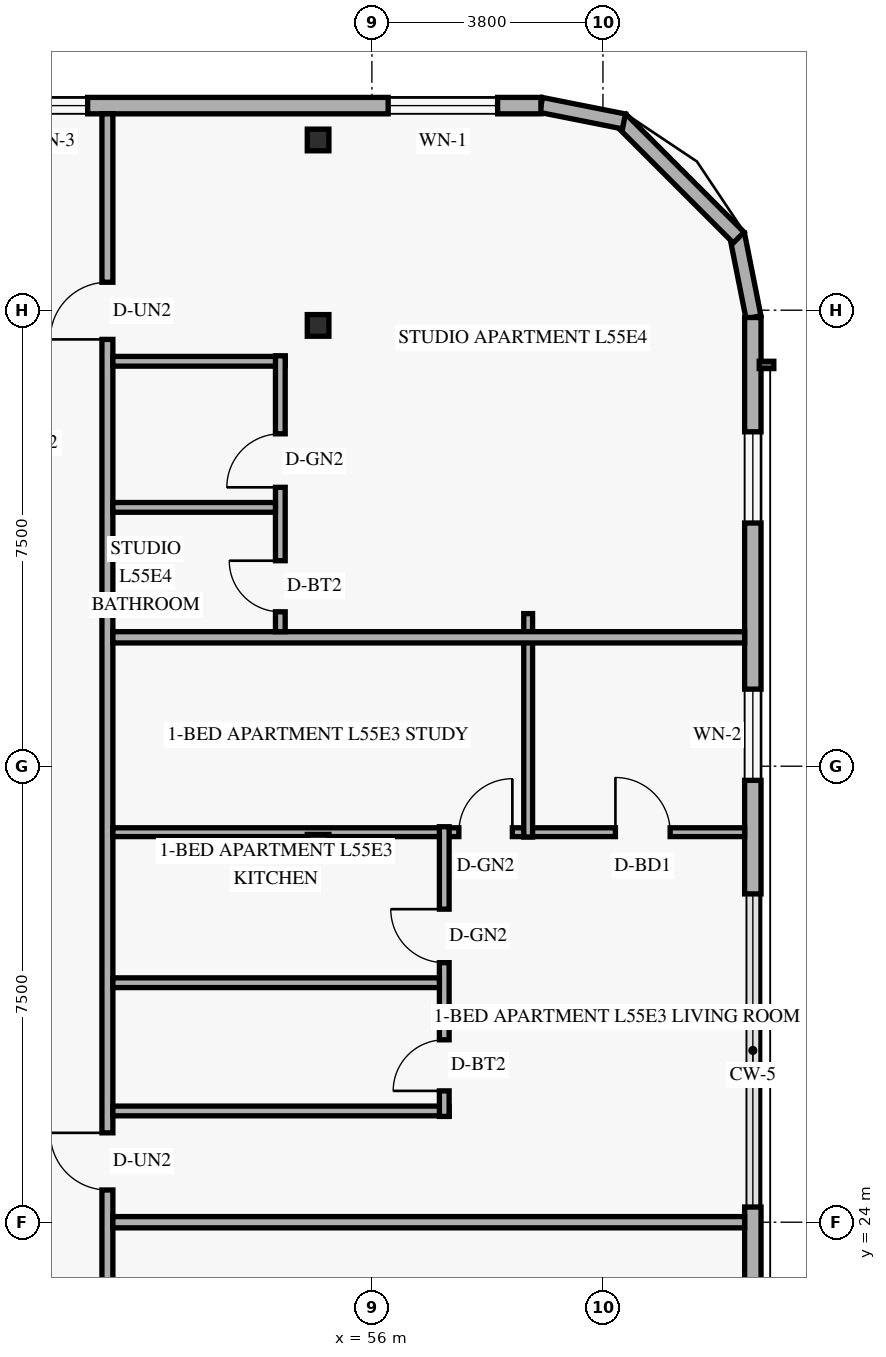
"""IFC4 building model, lengths in metres.
Left out: names, types, materials, properties, quantities, classifications, styles, units other than length and angle.
Written with IfcOpenShell. Run it as: python <this file> out.ifc"""

import sys

from ifc_helpers import new_model, si_unit, direction, frame, frame_2d, origin, origin_2d, place, context, subcontext, project, spatial, rectangle, hollow_rectangle, extrude, element, fill, save


model = new_model("IFC4")
c1 = context("Model", 3, precision=1e-05, world=origin(), true_north=direction((0.0, 1.0)))
c2 = subcontext(c1, "Body", "Model", "MODEL_VIEW")
j1 = project(units=[si_unit("LENGTHUNIT", "METRE"), si_unit("PLANEANGLEUNIT", "RADIAN")], contexts=[c1])
p1 = place(None, origin())
s1 = spatial("IfcSite", under=j1, at=p1, CompositionType="ELEMENT")
p2 = place(p1, origin())
s2 = spatial("IfcBuilding", under=s1, at=p2, CompositionType="ELEMENT")
p3 = place(p2, frame((0.0, 0.0, 213.0)))
s3 = spatial("IfcBuildingStorey", under=s2, at=p3, CompositionType="ELEMENT", Elevation=213.0)
for number, where, z_axis, x_axis in (
    (1, (55.011, 30.2, 0.0), (0.058, 0.0, 0.998), (0.0, 1.0, 0.0)),
    (2, (55.011, 38.75, 0.0), (0.058, 0.0, 0.998), (0.0, 1.0, 0.0)),
    (3, (55.011, 41.8, 0.0), (0.058, 0.0, 0.998), (0.0, 1.0, 0.0)),
):
    element("IfcColumn", number, at=place(p3, frame(where, z_axis=z_axis, x_axis=x_axis)), inside=s3, PredefinedType="COLUMN", context=c2, shape_type="SweptSolid", body=[
        extrude(hollow_rectangle(XDim=0.356, YDim=0.356, WallThickness=0.016, at=origin_2d()), origin(), (0.0, 0.0, 1.0), 3.606),
    ])
p4 = place(p3, frame((62.276, 38.884, 0.0), z_axis=(0.0, 0.0, 1.0), x_axis=(-0.195135625965, 0.9807762678, 0.0)))
e4 = element("IfcWall", 4, at=p4, inside=s3, PredefinedType="SOLIDWALL", context=c2, shape_type="SweptSolid", body=[
    extrude(rectangle(XDim=1.389, YDim=0.25, at=frame_2d((0.694, 0.0))), origin(), (0.0, 0.0, 1.0), 3.36),
])
p5 = place(p3, frame((62.032, 40.195, 0.0), z_axis=(0.0, 0.0, 1.0), x_axis=(-0.707106781187, 0.707106781187, 0.0)))
e5 = element("IfcWall", 5, at=p5, inside=s3, PredefinedType="SOLIDWALL", context=c2, shape_type="SweptSolid", body=[
    extrude(rectangle(XDim=2.739, YDim=0.25, at=frame_2d((1.37, 0.0))), origin(), (0.0, 0.0, 1.0), 3.36),
])
p6 = place(p3, frame((60.146, 42.105, 0.0), z_axis=(0.0, 0.0, 1.0), x_axis=(-0.980809899341, 0.19496651342, 0.0)))
e6 = element("IfcWall", 6, at=p6, inside=s3, PredefinedType="SOLIDWALL", context=c2, shape_type="SweptSolid", body=[
    extrude(rectangle(XDim=1.389, YDim=0.25, at=frame_2d((0.694, 0.0))), origin(), (0.0, 0.0, 1.0), 3.36),
])
p7 = place(p3, frame((62.265, 9.12, 0.0), z_axis=(0.0, 0.0, 1.0), x_axis=(0.0, 1.0, 0.0)))
e7 = element("IfcWall", 7, at=p7, inside=s3, PredefinedType="SOLIDWALL", context=c2, shape_type="SweptSolid", body=[
    extrude(rectangle(XDim=15.13, YDim=0.27, at=frame_2d((7.565, 0.0))), origin(), (0.0, 0.0, 1.0), 3.36),
])
p8 = place(p7, frame((1.88, 0.0, 0.85)))
e8 = element("IfcOpeningElement", 8, at=p8, cuts=e7, PredefinedType="OPENING", context=c2, shape_type="SweptSolid", body=[
    extrude(rectangle(XDim=1.5, YDim=1.55, at=frame_2d((0.75, 0.775))), frame((0.0, 0.145, 0.0), z_axis=(0.0, -1.0, 0.0), x_axis=(1.0, 0.0, 0.0)), (0.0, 0.0, 1.0), 0.29),
])
p9 = place(p7, frame((7.455, 0.0, 0.85)))
e9 = element("IfcOpeningElement", 9, at=p9, cuts=e7, PredefinedType="OPENING", context=c2, shape_type="SweptSolid", body=[
    extrude(rectangle(XDim=1.5, YDim=1.55, at=frame_2d((0.75, 0.775))), frame((0.0, 0.145, 0.0), z_axis=(0.0, -1.0, 0.0), x_axis=(1.0, 0.0, 0.0)), (0.0, 0.0, 1.0), 0.29),
])
p10 = place(p7, frame((12.39, 0.0, 0.85)))
e10 = element("IfcOpeningElement", 10, at=p10, cuts=e7, PredefinedType="OPENING", context=c2, shape_type="SweptSolid", body=[
    extrude(rectangle(XDim=1.5, YDim=1.55, at=frame_2d((0.75, 0.775))), frame((0.0, 0.145, 0.0), z_axis=(0.0, -1.0, 0.0), x_axis=(1.0, 0.0, 0.0)), (0.0, 0.0, 1.0), 0.29),
])
p11 = place(p3, frame((62.265, 29.4, 0.0), z_axis=(0.0, 0.0, 1.0), x_axis=(0.0, 1.0, 0.0)))
e11 = element("IfcWall", 11, at=p11, inside=s3, PredefinedType="SOLIDWALL", context=c2, shape_type="SweptSolid", body=[
    extrude(rectangle(XDim=9.48, YDim=0.27, at=frame_2d((4.74, 0.0))), origin(), (0.0, 0.0, 1.0), 3.36),
])
p12 = place(p11, frame((1.867, 0.0, 0.85)))
e12 = element("IfcOpeningElement", 12, at=p12, cuts=e11, PredefinedType="OPENING", context=c2, shape_type="SweptSolid", body=[
    extrude(rectangle(XDim=1.5, YDim=1.55, at=frame_2d((0.75, 0.775))), frame((0.0, 0.145, 0.0), z_axis=(0.0, -1.0, 0.0), x_axis=(1.0, 0.0, 0.0)), (0.0, 0.0, 1.0), 0.29),
])
p13 = place(p11, frame((6.1, 0.0, 0.85)))
e13 = element("IfcOpeningElement", 13, at=p13, cuts=e11, PredefinedType="OPENING", context=c2, shape_type="SweptSolid", body=[
    extrude(rectangle(XDim=1.5, YDim=1.55, at=frame_2d((0.75, 0.775))), frame((0.0, 0.145, 0.0), z_axis=(0.0, -1.0, 0.0), x_axis=(1.0, 0.0, 0.0)), (0.0, 0.0, 1.0), 0.29),
])
p14 = place(p3, frame((58.78, 42.365, 0.0), z_axis=(0.0, 0.0, 1.0), x_axis=(-1.0, 0.0, 0.0)))
e14 = element("IfcWall", 14, at=p14, inside=s3, PredefinedType="SOLIDWALL", context=c2, shape_type="SweptSolid", body=[
    extrude(rectangle(XDim=32.96, YDim=0.27, at=frame_2d((16.48, 0.0))), origin(), (0.0, 0.0, 1.0), 3.36),
])
p15 = place(p14, frame((27.59, 0.0, 0.85)))
e15 = element("IfcOpeningElement", 15, at=p15, cuts=e14, PredefinedType="OPENING", context=c2, shape_type="SweptSolid", body=[
    extrude(rectangle(XDim=1.8, YDim=1.6, at=frame_2d((0.9, 0.8))), frame((0.0, 0.145, 0.0), z_axis=(0.0, -1.0, 0.0), x_axis=(1.0, 0.0, 0.0)), (0.0, 0.0, 1.0), 0.29),
])
p16 = place(p14, frame((15.123, 0.0, 0.85)))
e16 = element("IfcOpeningElement", 16, at=p16, cuts=e14, PredefinedType="OPENING", context=c2, shape_type="SweptSolid", body=[
    extrude(rectangle(XDim=1.8, YDim=1.6, at=frame_2d((0.9, 0.8))), frame((0.0, 0.145, 0.0), z_axis=(0.0, -1.0, 0.0), x_axis=(1.0, 0.0, 0.0)), (0.0, 0.0, 1.0), 0.29),
])
p17 = place(p14, frame((7.455, 0.0, 0.85)))
e17 = element("IfcOpeningElement", 17, at=p17, cuts=e14, PredefinedType="OPENING", context=c2, shape_type="SweptSolid", body=[
    extrude(rectangle(XDim=1.2, YDim=1.5, at=frame_2d((0.6, 0.75))), frame((0.0, 0.145, 0.0), z_axis=(0.0, -1.0, 0.0), x_axis=(1.0, 0.0, 0.0)), (0.0, 0.0, 1.0), 0.29),
])
p18 = place(p14, frame((0.712, 0.0, 0.85)))
e18 = element("IfcOpeningElement", 18, at=p18, cuts=e14, PredefinedType="OPENING", context=c2, shape_type="SweptSolid", body=[
    extrude(rectangle(XDim=1.8, YDim=1.6, at=frame_2d((0.9, 0.8))), frame((0.0, 0.145, 0.0), z_axis=(0.0, -1.0, 0.0), x_axis=(1.0, 0.0, 0.0)), (0.0, 0.0, 1.0), 0.29),
])
p19 = place(p3, frame((51.65, 5.77, 0.0), z_axis=(0.0, 0.0, 1.0), x_axis=(0.0, 1.0, 0.0)))
e19 = element("IfcWall", 19, at=p19, inside=s3, PredefinedType="STANDARD", context=c2, shape_type="SweptSolid", body=[
    extrude(rectangle(XDim=36.46, YDim=0.18, at=frame_2d((18.23, 0.0))), origin(), (0.0, 0.0, 1.0), 2.803),
])
p20 = place(p19, frame((2.67, 0.0, 0.0)))
e20 = element("IfcOpeningElement", 20, at=p20, cuts=e19, PredefinedType="OPENING", context=c2, shape_type="SweptSolid", body=[
    extrude(rectangle(XDim=0.94, YDim=2.15, at=frame_2d((0.47, 1.075))), frame((0.0, 0.1, 0.0), z_axis=(0.0, -1.0, 0.0), x_axis=(1.0, 0.0, 0.0)), (0.0, 0.0, 1.0), 0.2),
])
p21 = place(p19, frame((13.61, 0.0, 0.0)))
e21 = element("IfcOpeningElement", 21, at=p21, cuts=e19, PredefinedType="OPENING", context=c2, shape_type="SweptSolid", body=[
    extrude(rectangle(XDim=0.94, YDim=2.15, at=frame_2d((0.47, 1.075))), frame((0.0, 0.1, 0.0), z_axis=(0.0, -1.0, 0.0), x_axis=(1.0, 0.0, 0.0)), (0.0, 0.0, 1.0), 0.2),
])
p22 = place(p19, frame((18.76, 0.0, 0.0)))
e22 = element("IfcOpeningElement", 22, at=p22, cuts=e19, PredefinedType="OPENING", context=c2, shape_type="SweptSolid", body=[
    extrude(rectangle(XDim=0.94, YDim=2.15, at=frame_2d((0.47, 1.075))), frame((0.0, 0.1, 0.0), z_axis=(0.0, -1.0, 0.0), x_axis=(1.0, 0.0, 0.0)), (0.0, 0.0, 1.0), 0.2),
])
p23 = place(p19, frame((32.75, 0.0, 0.0)))
e23 = element("IfcOpeningElement", 23, at=p23, cuts=e19, PredefinedType="OPENING", context=c2, shape_type="SweptSolid", body=[
    extrude(rectangle(XDim=0.94, YDim=2.15, at=frame_2d((0.47, 1.075))), frame((0.0, 0.1, 0.0), z_axis=(0.0, -1.0, 0.0), x_axis=(1.0, 0.0, 0.0)), (0.0, 0.0, 1.0), 0.2),
])
p24 = place(p3, frame((51.74, 24.0, 0.0), z_axis=(0.0, 0.0, 1.0), x_axis=(1.0, 0.0, 0.0)))
e24 = element("IfcWall", 24, at=p24, inside=s3, PredefinedType="PARTITIONING", context=c2, shape_type="SweptSolid", body=[
    extrude(rectangle(XDim=10.39, YDim=0.185, at=frame_2d((5.195, 0.0))), origin(), (0.0, 0.0, 1.0), 2.879),
])
p25 = place(p3, frame((51.74, 30.415, 0.0), z_axis=(0.0, 0.0, 1.0), x_axis=(1.0, 0.0, 0.0)))
e25 = element("IfcWall", 25, at=p25, inside=s3, PredefinedType="PARTITIONING", context=c2, shape_type="SweptSolid", body=[
    extrude(rectangle(XDim=10.39, YDim=0.145, at=frame_2d((5.195, 0.0))), origin(), (0.0, 0.0, 1.0), 2.879),
])
p26 = place(p25, frame((5.69, 0.0, 0.0)))
e26 = element("IfcOpeningElement", 26, at=p26, cuts=e25, PredefinedType="OPENING", context=c2, shape_type="SweptSolid", body=[
    extrude(rectangle(XDim=0.88, YDim=2.12, at=frame_2d((0.44, 1.06))), frame((0.0, 0.083, 0.0), z_axis=(0.0, -1.0, 0.0), x_axis=(1.0, 0.0, 0.0)), (0.0, 0.0, 1.0), 0.165),
])
p27 = place(p25, frame((8.265, 0.0, 0.0)))
e27 = element("IfcOpeningElement", 27, at=p27, cuts=e25, PredefinedType="OPENING", context=c2, shape_type="SweptSolid", body=[
    extrude(rectangle(XDim=0.9, YDim=2.14, at=frame_2d((0.45, 1.07))), frame((0.0, 0.083, 0.0), z_axis=(0.0, -1.0, 0.0), x_axis=(1.0, 0.0, 0.0)), (0.0, 0.0, 1.0), 0.165),
])
p28 = place(p3, frame((51.74, 25.83, 0.0), z_axis=(0.0, 0.0, 1.0), x_axis=(1.0, 0.0, 0.0)))
e28 = element("IfcWall", 28, at=p28, inside=s3, PredefinedType="PLUMBINGWALL", context=c2, shape_type="SweptSolid", body=[
    extrude(rectangle(XDim=5.53, YDim=0.16, at=frame_2d((2.765, 0.0))), origin(), (0.0, 0.0, 1.0), 2.879),
])
p29 = place(p3, frame((57.19, 25.74, 0.0), z_axis=(0.0, 0.0, 1.0), x_axis=(0.0, 1.0, 0.0)))
e29 = element("IfcWall", 29, at=p29, inside=s3, PredefinedType="PLUMBINGWALL", context=c2, shape_type="SweptSolid", body=[
    extrude(rectangle(XDim=4.765, YDim=0.16, at=frame_2d((2.382, 0.0))), origin(), (0.0, 0.0, 1.0), 3.36),
])
p30 = place(p29, frame((0.42, 0.0, 0.0)))
e30 = element("IfcOpeningElement", 30, at=p30, cuts=e29, PredefinedType="OPENING", context=c2, shape_type="SweptSolid", body=[
    extrude(rectangle(XDim=0.84, YDim=2.12, at=frame_2d((0.42, 1.06))), frame((0.0, 0.09, 0.0), z_axis=(0.0, -1.0, 0.0), x_axis=(1.0, 0.0, 0.0)), (0.0, 0.0, 1.0), 0.18),
])
p31 = place(p29, frame((2.529, 0.0, 0.0)))
e31 = element("IfcOpeningElement", 31, at=p31, cuts=e29, PredefinedType="OPENING", context=c2, shape_type="SweptSolid", body=[
    extrude(rectangle(XDim=0.88, YDim=2.12, at=frame_2d((0.44, 1.06))), frame((0.0, 0.09, 0.0), z_axis=(0.0, -1.0, 0.0), x_axis=(1.0, 0.0, 0.0)), (0.0, 0.0, 1.0), 0.18),
])
p32 = place(p3, frame((51.74, 27.939, 0.0), z_axis=(0.0, 0.0, 1.0), x_axis=(1.0, 0.0, 0.0)))
e32 = element("IfcWall", 32, at=p32, inside=s3, PredefinedType="PLUMBINGWALL", context=c2, shape_type="SweptSolid", body=[
    extrude(rectangle(XDim=5.37, YDim=0.16, at=frame_2d((2.685, 0.0))), origin(), (0.0, 0.0, 1.0), 2.879),
])
p33 = place(p3, frame((58.57, 30.335, 0.0), z_axis=(0.0, 0.0, 1.0), x_axis=(0.0, 1.0, 0.0)))
e33 = element("IfcWall", 33, at=p33, inside=s3, PredefinedType="PARTITIONING", context=c2, shape_type="SweptSolid", body=[
    extrude(rectangle(XDim=3.675, YDim=0.145, at=frame_2d((1.838, 0.0))), origin(), (0.0, 0.0, 1.0), 3.36),
])
p34 = place(p3, frame((51.74, 33.62, 0.0), z_axis=(0.0, 0.0, 1.0), x_axis=(1.0, 0.0, 0.0)))
e34 = element("IfcWall", 34, at=p34, inside=s3, PredefinedType="PARTITIONING", context=c2, shape_type="SweptSolid", body=[
    extrude(rectangle(XDim=10.39, YDim=0.185, at=frame_2d((5.195, 0.0))), origin(), (0.0, 0.0, 1.0), 2.879),
])
p35 = place(p3, frame((51.74, 38.16, 0.0), z_axis=(0.0, 0.0, 1.0), x_axis=(1.0, 0.0, 0.0)))
e35 = element("IfcWall", 35, at=p35, inside=s3, PredefinedType="PLUMBINGWALL", context=c2, shape_type="SweptSolid", body=[
    extrude(rectangle(XDim=2.834, YDim=0.16, at=frame_2d((1.417, 0.0))), origin(), (0.0, 0.0, 1.0), 3.36),
])
p36 = place(p3, frame((54.494, 33.712, 0.0), z_axis=(0.0, 0.0, 1.0), x_axis=(0.0, 1.0, 0.0)))
e36 = element("IfcWall", 36, at=p36, inside=s3, PredefinedType="PLUMBINGWALL", context=c2, shape_type="SweptSolid", body=[
    extrude(rectangle(XDim=4.538, YDim=0.16, at=frame_2d((2.269, 0.0))), origin(), (0.0, 0.0, 1.0), 3.039),
])
p37 = place(p36, frame((0.327, 0.0, 0.0)))
e37 = element("IfcOpeningElement", 37, at=p37, cuts=e36, PredefinedType="OPENING", context=c2, shape_type="SweptSolid", body=[
    extrude(rectangle(XDim=0.84, YDim=2.12, at=frame_2d((0.42, 1.06))), frame((0.0, 0.09, 0.0), z_axis=(0.0, -1.0, 0.0), x_axis=(1.0, 0.0, 0.0)), (0.0, 0.0, 1.0), 0.18),
])
p38 = place(p36, frame((2.375, 0.0, 0.0)))
e38 = element("IfcOpeningElement", 38, at=p38, cuts=e36, PredefinedType="OPENING", context=c2, shape_type="SweptSolid", body=[
    extrude(rectangle(XDim=0.88, YDim=2.12, at=frame_2d((0.44, 1.06))), frame((0.0, 0.09, 0.0), z_axis=(0.0, -1.0, 0.0), x_axis=(1.0, 0.0, 0.0)), (0.0, 0.0, 1.0), 0.18),
])
p39 = place(p3, frame((51.74, 35.757, 0.0), z_axis=(0.0, 0.0, 1.0), x_axis=(1.0, 0.0, 0.0)))
e39 = element("IfcWall", 39, at=p39, inside=s3, PredefinedType="PLUMBINGWALL", context=c2, shape_type="SweptSolid", body=[
    extrude(rectangle(XDim=2.674, YDim=0.16, at=frame_2d((1.337, 0.0))), origin(), (0.0, 0.0, 1.0), 3.36),
])
p40 = place(p12, origin())
e40 = element("IfcWindow", 40, at=p40, inside=s3, PartitioningType="SINGLE_PANEL", PredefinedType="WINDOW", context=c2, shape_type="SweptSolid", body=[
    extrude(rectangle(XDim=1.5, YDim=1.55, at=frame_2d((0.75, 0.775))), frame((0.0, 0.03, 0.0), z_axis=(0.0, -1.0, 0.0), x_axis=(1.0, 0.0, 0.0)), (0.0, 0.0, 1.0), 0.06),
])
fill(e12, e40)
p41 = place(p13, origin())
e41 = element("IfcWindow", 41, at=p41, inside=s3, PartitioningType="SINGLE_PANEL", PredefinedType="WINDOW", context=c2, shape_type="SweptSolid", body=[
    extrude(rectangle(XDim=1.5, YDim=1.55, at=frame_2d((0.75, 0.775))), frame((0.0, 0.03, 0.0), z_axis=(0.0, -1.0, 0.0), x_axis=(1.0, 0.0, 0.0)), (0.0, 0.0, 1.0), 0.06),
])
fill(e13, e41)
p42 = place(p17, origin())
e42 = element("IfcWindow", 42, at=p42, inside=s3, PartitioningType="SINGLE_PANEL", PredefinedType="WINDOW", context=c2, shape_type="SweptSolid", body=[
    extrude(rectangle(XDim=1.2, YDim=1.5, at=frame_2d((0.6, 0.75))), frame((0.0, 0.03, 0.0), z_axis=(0.0, -1.0, 0.0), x_axis=(1.0, 0.0, 0.0)), (0.0, 0.0, 1.0), 0.06),
])
fill(e17, e42)
p43 = place(p18, origin())
e43 = element("IfcWindow", 43, at=p43, inside=s3, PartitioningType="SINGLE_PANEL", PredefinedType="WINDOW", context=c2, shape_type="SweptSolid", body=[
    extrude(rectangle(XDim=1.8, YDim=1.6, at=frame_2d((0.9, 0.8))), frame((0.0, 0.03, 0.0), z_axis=(0.0, -1.0, 0.0), x_axis=(1.0, 0.0, 0.0)), (0.0, 0.0, 1.0), 0.06),
])
fill(e18, e43)
p44 = place(p22, origin())
e44 = element("IfcDoor", 44, at=p44, inside=s3, OperationType="SINGLE_SWING_RIGHT", PredefinedType="DOOR", context=c2, shape_type="SweptSolid", body=[
    extrude(rectangle(XDim=0.94, YDim=2.15, at=frame_2d((0.47, 1.075))), frame((0.0, 0.025, 0.0), z_axis=(0.0, -1.0, 0.0), x_axis=(1.0, 0.0, 0.0)), (0.0, 0.0, 1.0), 0.05),
])
fill(e22, e44)
p45 = place(p30, origin())
e45 = element("IfcDoor", 45, at=p45, inside=s3, OperationType="SINGLE_SWING_LEFT", PredefinedType="DOOR", context=c2, shape_type="SweptSolid", body=[
    extrude(rectangle(XDim=0.84, YDim=2.12, at=frame_2d((0.42, 1.06))), frame((0.0, 0.025, 0.0), z_axis=(0.0, -1.0, 0.0), x_axis=(1.0, 0.0, 0.0)), (0.0, 0.0, 1.0), 0.05),
])
fill(e30, e45)
p46 = place(p31, origin())
e46 = element("IfcDoor", 46, at=p46, inside=s3, OperationType="SINGLE_SWING_RIGHT", PredefinedType="DOOR", context=c2, shape_type="SweptSolid", body=[
    extrude(rectangle(XDim=0.88, YDim=2.12, at=frame_2d((0.44, 1.06))), frame((0.0, 0.025, 0.0), z_axis=(0.0, -1.0, 0.0), x_axis=(1.0, 0.0, 0.0)), (0.0, 0.0, 1.0), 0.05),
])
fill(e31, e46)
p47 = place(p26, origin())
e47 = element("IfcDoor", 47, at=p47, inside=s3, OperationType="SINGLE_SWING_RIGHT", PredefinedType="DOOR", context=c2, shape_type="SweptSolid", body=[
    extrude(rectangle(XDim=0.88, YDim=2.12, at=frame_2d((0.44, 1.06))), frame((0.0, 0.025, 0.0), z_axis=(0.0, -1.0, 0.0), x_axis=(1.0, 0.0, 0.0)), (0.0, 0.0, 1.0), 0.05),
])
fill(e26, e47)
p48 = place(p27, origin())
e48 = element("IfcDoor", 48, at=p48, inside=s3, OperationType="SINGLE_SWING_LEFT", PredefinedType="DOOR", context=c2, shape_type="SweptSolid", body=[
    extrude(rectangle(XDim=0.9, YDim=2.14, at=frame_2d((0.45, 1.07))), frame((0.0, 0.025, 0.0), z_axis=(0.0, -1.0, 0.0), x_axis=(1.0, 0.0, 0.0)), (0.0, 0.0, 1.0), 0.05),
])
fill(e27, e48)
p49 = place(p23, origin())
e49 = element("IfcDoor", 49, at=p49, inside=s3, OperationType="SINGLE_SWING_LEFT", PredefinedType="DOOR", context=c2, shape_type="SweptSolid", body=[
    extrude(rectangle(XDim=0.94, YDim=2.15, at=frame_2d((0.47, 1.075))), frame((0.0, 0.025, 0.0), z_axis=(0.0, -1.0, 0.0), x_axis=(1.0, 0.0, 0.0)), (0.0, 0.0, 1.0), 0.05),
])
fill(e23, e49)
p50 = place(p37, origin())
e50 = element("IfcDoor", 50, at=p50, inside=s3, OperationType="SINGLE_SWING_RIGHT", PredefinedType="DOOR", context=c2, shape_type="SweptSolid", body=[
    extrude(rectangle(XDim=0.84, YDim=2.12, at=frame_2d((0.42, 1.06))), frame((0.0, 0.025, 0.0), z_axis=(0.0, -1.0, 0.0), x_axis=(1.0, 0.0, 0.0)), (0.0, 0.0, 1.0), 0.05),
])
fill(e37, e50)
p51 = place(p38, origin())
e51 = element("IfcDoor", 51, at=p51, inside=s3, OperationType="SINGLE_SWING_LEFT", PredefinedType="DOOR", context=c2, shape_type="SweptSolid", body=[
    extrude(rectangle(XDim=0.88, YDim=2.12, at=frame_2d((0.44, 1.06))), frame((0.0, 0.025, 0.0), z_axis=(0.0, -1.0, 0.0), x_axis=(1.0, 0.0, 0.0)), (0.0, 0.0, 1.0), 0.05),
])
fill(e38, e51)
save(model, sys.argv[1])
